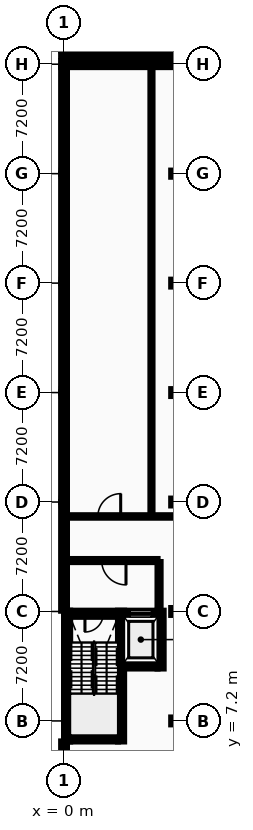
"""IFC4 building model, lengths in metres.
Left out: names, types, materials, properties, quantities, classifications, styles, units other than length and angle.
Written with IfcOpenShell. Run it as: python <this file> out.ifc"""

import sys

from ifc_helpers import new_model, si_unit, direction, frame, frame_2d, origin, origin_2d, place, context, subcontext, project, spatial, rectangle, i_section, extrude, element, fill, save


model = new_model("IFC4")
c1 = context("Model", 3, precision=1e-05, world=origin(), true_north=direction((0.0, 1.0)))
c2 = subcontext(c1, "Body", "Model", "MODEL_VIEW")
j1 = project(units=[si_unit("LENGTHUNIT", "METRE"), si_unit("PLANEANGLEUNIT", "RADIAN")], contexts=[c1])
p1 = place(None, origin())
s1 = spatial("IfcSite", under=j1, at=p1, CompositionType="ELEMENT")
p2 = place(p1, origin())
s2 = spatial("IfcBuilding", under=s1, at=p2, CompositionType="ELEMENT")
p3 = place(p2, frame((0.0, 0.0, 9.6)))
s3 = spatial("IfcBuildingStorey", under=s2, at=p3, CompositionType="ELEMENT", Elevation=9.6)
for number, where, z_axis, x_axis in (
    (1, (0.0, 21.6, 0.0), (0.0, 0.0, 1.0), (1.0, 0.0, 0.0)),
    (2, (0.0, 28.8, 0.0), (0.0, 0.0, 1.0), (1.0, 0.0, 0.0)),
    (3, (0.0, 36.0, 0.0), (0.0, 0.0, 1.0), (1.0, 0.0, 0.0)),
):
    element("IfcColumn", number, at=place(p3, frame(where, z_axis=z_axis, x_axis=x_axis)), inside=s3, PredefinedType="COLUMN", context=c2, shape_type="SweptSolid", body=[
        extrude(i_section(OverallWidth=0.3, OverallDepth=0.45, WebThickness=0.014, FlangeThickness=0.026, FilletRadius=0.027, at=origin_2d()), origin(), (0.0, 0.0, 1.0), 4.4),
    ])
p4 = place(p3, frame((0.0, 43.2, 0.0), z_axis=(0.0, 0.0, 1.0), x_axis=(1.0, 0.0, 0.0)))
e4 = element("IfcColumn", 4, at=p4, inside=s3, PredefinedType="COLUMN", context=c2, shape_type="SweptSolid", body=[
    extrude(i_section(OverallWidth=0.3, OverallDepth=0.4, WebThickness=0.013, FlangeThickness=0.024, FilletRadius=0.027, at=origin_2d()), origin(), (0.0, 0.0, 1.0), 4.4),
])
p5 = place(p3, frame((0.0, 50.4, 0.0), z_axis=(0.0, 0.0, 1.0), x_axis=(1.0, 0.0, 0.0)))
e5 = element("IfcColumn", 5, at=p5, inside=s3, PredefinedType="COLUMN", context=c2, shape_type="SweptSolid", body=[
    extrude(i_section(OverallWidth=0.3, OverallDepth=0.36, WebThickness=0.012, FlangeThickness=0.022, FilletRadius=0.027, at=origin_2d()), origin(), (0.0, 0.0, 1.0), 4.4),
])
p6 = place(p3, frame((0.0, 51.12, 0.0), z_axis=(0.0, 0.0, 1.0), x_axis=(1.0, 0.0, 0.0)))
e6 = element("IfcColumn", 6, at=p6, inside=s3, PredefinedType="COLUMN", context=c2, shape_type="SweptSolid", body=[
    extrude(i_section(OverallWidth=0.24, OverallDepth=0.24, WebThickness=0.01, FlangeThickness=0.017, FilletRadius=0.021, at=origin_2d()), origin(), (0.0, 0.0, 1.0), 4.4),
])
for number, where, z_axis, x_axis in (
    (7, (7.2, 7.2, 0.0), (0.0, 0.0, 1.0), (1.0, 0.0, 0.0)),
    (8, (7.2, 14.4, 0.0), (0.0, 0.0, 1.0), (1.0, 0.0, 0.0)),
    (9, (7.2, 21.6, 0.0), (0.0, 0.0, 1.0), (1.0, 0.0, 0.0)),
    (10, (7.2, 28.8, 0.0), (0.0, 0.0, 1.0), (1.0, 0.0, 0.0)),
    (11, (7.2, 36.0, 0.0), (0.0, 0.0, 1.0), (1.0, 0.0, 0.0)),
):
    element("IfcColumn", number, at=place(p3, frame(where, z_axis=z_axis, x_axis=x_axis)), inside=s3, PredefinedType="COLUMN", context=c2, shape_type="SweptSolid", body=[
        extrude(i_section(OverallWidth=0.3, OverallDepth=0.45, WebThickness=0.014, FlangeThickness=0.026, FilletRadius=0.027, at=origin_2d()), origin(), (0.0, 0.0, 1.0), 4.4),
    ])
p7 = place(p3, frame((7.2, 43.2, 0.0), z_axis=(0.0, 0.0, 1.0), x_axis=(1.0, 0.0, 0.0)))
e12 = element("IfcColumn", 12, at=p7, inside=s3, PredefinedType="COLUMN", context=c2, shape_type="SweptSolid", body=[
    extrude(i_section(OverallWidth=0.3, OverallDepth=0.4, WebThickness=0.013, FlangeThickness=0.024, FilletRadius=0.027, at=origin_2d()), origin(), (0.0, 0.0, 1.0), 4.4),
])
p8 = place(p3, frame((7.2, 50.4, 0.0), z_axis=(0.0, 0.0, 1.0), x_axis=(1.0, 0.0, 0.0)))
e13 = element("IfcColumn", 13, at=p8, inside=s3, PredefinedType="COLUMN", context=c2, shape_type="SweptSolid", body=[
    extrude(i_section(OverallWidth=0.3, OverallDepth=0.36, WebThickness=0.012, FlangeThickness=0.022, FilletRadius=0.027, at=origin_2d()), origin(), (0.0, 0.0, 1.0), 4.4),
])
p9 = place(p3, frame((7.2, 51.12, 0.0), z_axis=(0.0, 0.0, 1.0), x_axis=(1.0, 0.0, 0.0)))
e14 = element("IfcColumn", 14, at=p9, inside=s3, PredefinedType="COLUMN", context=c2, shape_type="SweptSolid", body=[
    extrude(i_section(OverallWidth=0.24, OverallDepth=0.24, WebThickness=0.01, FlangeThickness=0.017, FilletRadius=0.021, at=origin_2d()), origin(), (0.0, 0.0, 1.0), 4.4),
])
p10 = place(p3, frame((7.31, 50.4, 0.0), z_axis=(0.0, 0.0, 1.0), x_axis=(-1.0, 0.0, 0.0)))
e15 = element("IfcWall", 15, at=p10, inside=s3, PredefinedType="STANDARD", context=c2, shape_type="SweptSolid", body=[
    extrude(rectangle(XDim=7.5, YDim=0.38, at=frame_2d((3.75, 0.0))), origin(), (0.0, 0.0, 1.0), 3.895),
])
p11 = place(p10, frame((4.65, 0.0, 0.95)))
e16 = element("IfcOpeningElement", 16, at=p11, cuts=e15, PredefinedType="OPENING", context=c2, shape_type="SweptSolid", body=[
    extrude(rectangle(XDim=1.2, YDim=1.296, at=frame_2d((0.6, 0.648))), frame((0.0, 0.2, 0.0), z_axis=(0.0, -1.0, 0.0), x_axis=(1.0, 0.0, 0.0)), (0.0, 0.0, 1.0), 0.4),
])
p12 = place(p3, frame((0.0, 5.85, 0.0), z_axis=(0.0, 0.0, 1.0), x_axis=(0.0, -1.0, 0.0)))
e17 = element("IfcWall", 17, at=p12, inside=s3, PredefinedType="STANDARD", context=c2, shape_type="SweptSolid", body=[
    extrude(rectangle(XDim=5.66, YDim=0.38, at=frame_2d((2.83, 0.0))), origin(), (0.0, 0.0, 1.0), 4.2),
])
p13 = place(p12, frame((2.196, 0.0, 0.95)))
e18 = element("IfcOpeningElement", 18, at=p13, cuts=e17, PredefinedType="OPENING", context=c2, shape_type="SweptSolid", body=[
    extrude(rectangle(XDim=1.268, YDim=1.296, at=frame_2d((0.634, 0.648))), frame((0.0, 0.2, 0.0), z_axis=(0.0, -1.0, 0.0), x_axis=(1.0, 0.0, 0.0)), (0.0, 0.0, 1.0), 0.4),
])
p14 = place(p3, frame((0.0, 21.6, 0.0), z_axis=(0.0, 0.0, 1.0), x_axis=(0.0, -1.0, 0.0)))
e19 = element("IfcWall", 19, at=p14, inside=s3, PredefinedType="STANDARD", context=c2, shape_type="SweptSolid", body=[
    extrude(rectangle(XDim=7.15, YDim=0.38, at=frame_2d((3.575, 0.0))), origin(), (0.0, 0.0, 1.0), 4.2),
])
p15 = place(p14, frame((1.715, 0.0, 0.95)))
e20 = element("IfcOpeningElement", 20, at=p15, cuts=e19, PredefinedType="OPENING", context=c2, shape_type="SweptSolid", body=[
    extrude(rectangle(XDim=0.86, YDim=1.332, at=frame_2d((0.43, 0.666))), frame((0.0, 0.2, 0.0), z_axis=(0.0, -1.0, 0.0), x_axis=(1.0, 0.0, 0.0)), (0.0, 0.0, 1.0), 0.4),
])
p16 = place(p14, frame((4.575, 0.0, 0.95)))
e21 = element("IfcOpeningElement", 21, at=p16, cuts=e19, PredefinedType="OPENING", context=c2, shape_type="SweptSolid", body=[
    extrude(rectangle(XDim=0.86, YDim=1.332, at=frame_2d((0.43, 0.666))), frame((0.0, 0.2, 0.0), z_axis=(0.0, -1.0, 0.0), x_axis=(1.0, 0.0, 0.0)), (0.0, 0.0, 1.0), 0.4),
])
p17 = place(p3, frame((0.0, 28.8, 0.0), z_axis=(0.0, 0.0, 1.0), x_axis=(0.0, -1.0, 0.0)))
e22 = element("IfcWall", 22, at=p17, inside=s3, PredefinedType="STANDARD", context=c2, shape_type="SweptSolid", body=[
    extrude(rectangle(XDim=7.2, YDim=0.38, at=frame_2d((3.6, 0.0))), origin(), (0.0, 0.0, 1.0), 3.885),
])
p18 = place(p17, frame((1.713, 0.0, 0.95)))
e23 = element("IfcOpeningElement", 23, at=p18, cuts=e22, PredefinedType="OPENING", context=c2, shape_type="SweptSolid", body=[
    extrude(rectangle(XDim=0.894, YDim=1.332, at=frame_2d((0.447, 0.666))), frame((0.0, 0.2, 0.0), z_axis=(0.0, -1.0, 0.0), x_axis=(1.0, 0.0, 0.0)), (0.0, 0.0, 1.0), 0.4),
])
p19 = place(p17, frame((4.593, 0.0, 0.95)))
e24 = element("IfcOpeningElement", 24, at=p19, cuts=e22, PredefinedType="OPENING", context=c2, shape_type="SweptSolid", body=[
    extrude(rectangle(XDim=0.894, YDim=1.332, at=frame_2d((0.447, 0.666))), frame((0.0, 0.2, 0.0), z_axis=(0.0, -1.0, 0.0), x_axis=(1.0, 0.0, 0.0)), (0.0, 0.0, 1.0), 0.4),
])
p20 = place(p3, frame((0.0, 36.0, 0.0), z_axis=(0.0, 0.0, 1.0), x_axis=(0.0, -1.0, 0.0)))
e25 = element("IfcWall", 25, at=p20, inside=s3, PredefinedType="STANDARD", context=c2, shape_type="SweptSolid", body=[
    extrude(rectangle(XDim=7.2, YDim=0.38, at=frame_2d((3.6, 0.0))), origin(), (0.0, 0.0, 1.0), 3.885),
])
p21 = place(p20, frame((1.696, 0.0, 0.95)))
e26 = element("IfcOpeningElement", 26, at=p21, cuts=e25, PredefinedType="OPENING", context=c2, shape_type="SweptSolid", body=[
    extrude(rectangle(XDim=0.928, YDim=1.332, at=frame_2d((0.464, 0.666))), frame((0.0, 0.2, 0.0), z_axis=(0.0, -1.0, 0.0), x_axis=(1.0, 0.0, 0.0)), (0.0, 0.0, 1.0), 0.4),
])
p22 = place(p20, frame((4.576, 0.0, 0.95)))
e27 = element("IfcOpeningElement", 27, at=p22, cuts=e25, PredefinedType="OPENING", context=c2, shape_type="SweptSolid", body=[
    extrude(rectangle(XDim=0.928, YDim=1.332, at=frame_2d((0.464, 0.666))), frame((0.0, 0.2, 0.0), z_axis=(0.0, -1.0, 0.0), x_axis=(1.0, 0.0, 0.0)), (0.0, 0.0, 1.0), 0.4),
])
p23 = place(p3, frame((0.0, 43.2, 0.0), z_axis=(0.0, 0.0, 1.0), x_axis=(0.0, -1.0, 0.0)))
e28 = element("IfcWall", 28, at=p23, inside=s3, PredefinedType="STANDARD", context=c2, shape_type="SweptSolid", body=[
    extrude(rectangle(XDim=7.2, YDim=0.38, at=frame_2d((3.6, 0.0))), origin(), (0.0, 0.0, 1.0), 3.885),
])
p24 = place(p23, frame((1.679, 0.0, 0.95)))
e29 = element("IfcOpeningElement", 29, at=p24, cuts=e28, PredefinedType="OPENING", context=c2, shape_type="SweptSolid", body=[
    extrude(rectangle(XDim=0.962, YDim=1.332, at=frame_2d((0.481, 0.666))), frame((0.0, 0.2, 0.0), z_axis=(0.0, -1.0, 0.0), x_axis=(1.0, 0.0, 0.0)), (0.0, 0.0, 1.0), 0.4),
])
p25 = place(p23, frame((4.559, 0.0, 0.95)))
e30 = element("IfcOpeningElement", 30, at=p25, cuts=e28, PredefinedType="OPENING", context=c2, shape_type="SweptSolid", body=[
    extrude(rectangle(XDim=0.962, YDim=1.332, at=frame_2d((0.481, 0.666))), frame((0.0, 0.2, 0.0), z_axis=(0.0, -1.0, 0.0), x_axis=(1.0, 0.0, 0.0)), (0.0, 0.0, 1.0), 0.4),
])
p26 = place(p3, frame((0.0, 50.21, 0.0), z_axis=(0.0, 0.0, 1.0), x_axis=(0.0, -1.0, 0.0)))
e31 = element("IfcWall", 31, at=p26, inside=s3, PredefinedType="STANDARD", context=c2, shape_type="SweptSolid", body=[
    extrude(rectangle(XDim=7.01, YDim=0.38, at=frame_2d((3.505, 0.0))), origin(), (0.0, 0.0, 1.0), 3.885),
])
p27 = place(p26, frame((1.605, 0.0, 0.95)))
e32 = element("IfcOpeningElement", 32, at=p27, cuts=e31, PredefinedType="OPENING", context=c2, shape_type="SweptSolid", body=[
    extrude(rectangle(XDim=0.996, YDim=1.332, at=frame_2d((0.498, 0.666))), frame((0.0, 0.2, 0.0), z_axis=(0.0, -1.0, 0.0), x_axis=(1.0, 0.0, 0.0)), (0.0, 0.0, 1.0), 0.4),
])
p28 = place(p26, frame((4.409, 0.0, 0.95)))
e33 = element("IfcOpeningElement", 33, at=p28, cuts=e31, PredefinedType="OPENING", context=c2, shape_type="SweptSolid", body=[
    extrude(rectangle(XDim=0.996, YDim=1.332, at=frame_2d((0.498, 0.666))), frame((0.0, 0.2, 0.0), z_axis=(0.0, -1.0, 0.0), x_axis=(1.0, 0.0, 0.0)), (0.0, 0.0, 1.0), 0.4),
])
p29 = place(p3, frame((-0.19, 51.12, 0.0), z_axis=(0.0, 0.0, 1.0), x_axis=(1.0, 0.0, 0.0)))
e34 = element("IfcWall", 34, at=p29, inside=s3, PredefinedType="STANDARD", context=c2, shape_type="SweptSolid", body=[
    extrude(rectangle(XDim=7.39, YDim=0.38, at=frame_2d((3.695, 0.0))), origin(), (0.0, 0.0, 1.0), 3.875),
])
p30 = place(p29, frame((1.668, 0.0, 0.95)))
e35 = element("IfcOpeningElement", 35, at=p30, cuts=e34, PredefinedType="OPENING", context=c2, shape_type="SweptSolid", body=[
    extrude(rectangle(XDim=1.098, YDim=1.26, at=frame_2d((0.549, 0.63))), frame((0.0, 0.2, 0.0), z_axis=(0.0, -1.0, 0.0), x_axis=(1.0, 0.0, 0.0)), (0.0, 0.0, 1.0), 0.4),
])
p31 = place(p29, frame((4.624, 0.0, 0.95)))
e36 = element("IfcOpeningElement", 36, at=p31, cuts=e34, PredefinedType="OPENING", context=c2, shape_type="SweptSolid", body=[
    extrude(rectangle(XDim=1.098, YDim=1.26, at=frame_2d((0.549, 0.63))), frame((0.0, 0.2, 0.0), z_axis=(0.0, -1.0, 0.0), x_axis=(1.0, 0.0, 0.0)), (0.0, 0.0, 1.0), 0.4),
])
p32 = place(p3, frame((0.4, 6.05, 0.0), z_axis=(0.0, 0.0, 1.0), x_axis=(1.0, 0.0, 0.0)))
e37 = element("IfcWall", 37, at=p32, inside=s3, PredefinedType="SHEAR", context=c2, shape_type="SweptSolid", body=[
    extrude(rectangle(XDim=3.15, YDim=0.4, at=frame_2d((1.575, 0.0))), origin(), (0.0, 0.0, 1.0), 4.2),
])
p33 = place(p3, frame((0.4, 14.25, 0.0), z_axis=(0.0, 0.0, 1.0), x_axis=(1.0, 0.0, 0.0)))
e38 = element("IfcWall", 38, at=p33, inside=s3, PredefinedType="SHEAR", context=c2, shape_type="SweptSolid", body=[
    extrude(rectangle(XDim=3.15, YDim=0.4, at=frame_2d((1.575, 0.0))), origin(), (0.0, 0.0, 1.0), 4.2),
])
p34 = place(p33, frame((0.975, 0.0, 0.0)))
e39 = element("IfcOpeningElement", 39, at=p34, cuts=e38, PredefinedType="OPENING", context=c2, shape_type="SweptSolid", body=[
    extrude(rectangle(XDim=1.2, YDim=2.15, at=frame_2d((0.6, 1.075))), frame((0.0, 0.21, 0.0), z_axis=(0.0, -1.0, 0.0), x_axis=(1.0, 0.0, 0.0)), (0.0, 0.0, 1.0), 0.42),
])
for number, where, z_axis, x_axis in (
    (40, (0.2, 5.85, 0.0), (0.0, 0.0, 1.0), (0.0, 1.0, 0.0)),
    (41, (3.75, 5.85, 0.0), (0.0, 0.0, 1.0), (0.0, 1.0, 0.0)),
):
    element("IfcWall", number, at=place(p3, frame(where, z_axis=z_axis, x_axis=x_axis)), inside=s3, PredefinedType="SHEAR", context=c2, shape_type="SweptSolid", body=[
        extrude(rectangle(XDim=8.6, YDim=0.4, at=frame_2d((4.3, 0.0))), origin(), (0.0, 0.0, 1.0), 4.2),
    ])
p35 = place(p3, frame((3.95, 10.85, 0.0), z_axis=(0.0, 0.0, 1.0), x_axis=(1.0, 0.0, 0.0)))
e42 = element("IfcWall", 42, at=p35, inside=s3, PredefinedType="SHEAR", context=c2, shape_type="SweptSolid", body=[
    extrude(rectangle(XDim=2.2, YDim=0.4, at=frame_2d((1.1, 0.0))), origin(), (0.0, 0.0, 1.0), 4.2),
])
p36 = place(p3, frame((3.95, 14.25, 0.0), z_axis=(0.0, 0.0, 1.0), x_axis=(1.0, 0.0, 0.0)))
e43 = element("IfcWall", 43, at=p36, inside=s3, PredefinedType="SHEAR", context=c2, shape_type="SweptSolid", body=[
    extrude(rectangle(XDim=2.2, YDim=0.4, at=frame_2d((1.1, 0.0))), origin(), (0.0, 0.0, 1.0), 4.2),
])
p37 = place(p36, frame((0.4, 0.0, 0.0)))
e44 = element("IfcOpeningElement", 44, at=p37, cuts=e43, PredefinedType="OPENING", context=c2, shape_type="SweptSolid", body=[
    extrude(rectangle(XDim=1.4, YDim=2.2, at=frame_2d((0.7, 1.1))), frame((0.0, 0.21, 0.0), z_axis=(0.0, -1.0, 0.0), x_axis=(1.0, 0.0, 0.0)), (0.0, 0.0, 1.0), 0.42),
])
p38 = place(p3, frame((6.35, 10.65, 0.0), z_axis=(0.0, 0.0, 1.0), x_axis=(0.0, 1.0, 0.0)))
e45 = element("IfcWall", 45, at=p38, inside=s3, PredefinedType="SHEAR", context=c2, shape_type="SweptSolid", body=[
    extrude(rectangle(XDim=3.8, YDim=0.4, at=frame_2d((1.9, 0.0))), origin(), (0.0, 0.0, 1.0), 4.2),
])
p39 = place(p3, frame((0.4, 17.75, 0.0), z_axis=(0.0, 0.0, 1.0), x_axis=(1.0, 0.0, 0.0)))
e46 = element("IfcWall", 46, at=p39, inside=s3, PredefinedType="PARTITIONING", context=c2, shape_type="SweptSolid", body=[
    extrude(rectangle(XDim=5.75, YDim=0.2, at=frame_2d((2.875, 0.0))), origin(), (0.0, 0.0, 1.0), 4.2),
])
p40 = place(p39, frame((2.075, 0.0, 0.0)))
e47 = element("IfcOpeningElement", 47, at=p40, cuts=e46, PredefinedType="OPENING", context=c2, shape_type="SweptSolid", body=[
    extrude(rectangle(XDim=1.6, YDim=2.2, at=frame_2d((0.8, 1.1))), frame((0.0, 0.11, 0.0), z_axis=(0.0, -1.0, 0.0), x_axis=(1.0, 0.0, 0.0)), (0.0, 0.0, 1.0), 0.22),
])
p41 = place(p3, frame((6.25, 14.45, 0.0), z_axis=(0.0, 0.0, 1.0), x_axis=(0.0, 1.0, 0.0)))
e48 = element("IfcWall", 48, at=p41, inside=s3, PredefinedType="PARTITIONING", context=c2, shape_type="SweptSolid", body=[
    extrude(rectangle(XDim=3.2, YDim=0.2, at=frame_2d((1.6, 0.0))), origin(), (0.0, 0.0, 1.0), 4.2),
])
p42 = place(p3, frame((0.2, 20.65, 0.0), z_axis=(0.0, 0.0, 1.0), x_axis=(1.0, 0.0, 0.0)))
e49 = element("IfcWall", 49, at=p42, inside=s3, PredefinedType="PARTITIONING", context=c2, shape_type="SweptSolid", body=[
    extrude(rectangle(XDim=13.9, YDim=0.16, at=frame_2d((6.95, 0.0))), origin(), (0.0, 0.0, 1.0), 4.2),
])
p43 = place(p42, frame((2.025, 0.0, 0.0)))
e50 = element("IfcOpeningElement", 50, at=p43, cuts=e49, PredefinedType="OPENING", context=c2, shape_type="SweptSolid", body=[
    extrude(rectangle(XDim=1.5, YDim=2.2, at=frame_2d((0.75, 1.1))), frame((0.0, 0.09, 0.0), z_axis=(0.0, -1.0, 0.0), x_axis=(1.0, 0.0, 0.0)), (0.0, 0.0, 1.0), 0.18),
])
p44 = place(p42, frame((9.272, 0.0, 0.0)))
e51 = element("IfcOpeningElement", 51, at=p44, cuts=e49, PredefinedType="OPENING", context=c2, shape_type="SweptSolid", body=[
    extrude(rectangle(XDim=0.906, YDim=2.152, at=frame_2d((0.453, 1.076))), frame((0.0, 0.09, 0.0), z_axis=(0.0, -1.0, 0.0), x_axis=(1.0, 0.0, 0.0)), (0.0, 0.0, 1.0), 0.18),
])
p45 = place(p3, frame((5.75, 20.73, 0.0), z_axis=(0.0, 0.0, 1.0), x_axis=(0.0, 1.0, 0.0)))
e52 = element("IfcWall", 52, at=p45, inside=s3, PredefinedType="PARTITIONING", context=c2, shape_type="SweptSolid", body=[
    extrude(rectangle(XDim=29.47, YDim=0.135, at=frame_2d((14.735, 0.0))), origin(), (0.0, 0.0, 1.0), 4.2),
])
p46 = place(p11, origin())
e53 = element("IfcWindow", 53, at=p46, inside=s3, PartitioningType="SINGLE_PANEL", PredefinedType="WINDOW", context=c2, shape_type="SweptSolid", body=[
    extrude(rectangle(XDim=1.2, YDim=1.296, at=frame_2d((0.6, 0.648))), frame((0.0, 0.03, 0.0), z_axis=(0.0, -1.0, 0.0), x_axis=(1.0, 0.0, 0.0)), (0.0, 0.0, 1.0), 0.06),
])
fill(e16, e53)
p47 = place(p15, origin())
e54 = element("IfcWindow", 54, at=p47, inside=s3, PartitioningType="SINGLE_PANEL", PredefinedType="WINDOW", context=c2, shape_type="SweptSolid", body=[
    extrude(rectangle(XDim=0.86, YDim=1.332, at=frame_2d((0.43, 0.666))), frame((0.0, 0.03, 0.0), z_axis=(0.0, -1.0, 0.0), x_axis=(1.0, 0.0, 0.0)), (0.0, 0.0, 1.0), 0.06),
])
fill(e20, e54)
p48 = place(p16, origin())
e55 = element("IfcWindow", 55, at=p48, inside=s3, PartitioningType="SINGLE_PANEL", PredefinedType="WINDOW", context=c2, shape_type="SweptSolid", body=[
    extrude(rectangle(XDim=0.86, YDim=1.332, at=frame_2d((0.43, 0.666))), frame((0.0, 0.03, 0.0), z_axis=(0.0, -1.0, 0.0), x_axis=(1.0, 0.0, 0.0)), (0.0, 0.0, 1.0), 0.06),
])
fill(e21, e55)
p49 = place(p18, origin())
e56 = element("IfcWindow", 56, at=p49, inside=s3, PartitioningType="SINGLE_PANEL", PredefinedType="WINDOW", context=c2, shape_type="SweptSolid", body=[
    extrude(rectangle(XDim=0.894, YDim=1.332, at=frame_2d((0.447, 0.666))), frame((0.0, 0.03, 0.0), z_axis=(0.0, -1.0, 0.0), x_axis=(1.0, 0.0, 0.0)), (0.0, 0.0, 1.0), 0.06),
])
fill(e23, e56)
p50 = place(p19, origin())
e57 = element("IfcWindow", 57, at=p50, inside=s3, PartitioningType="SINGLE_PANEL", PredefinedType="WINDOW", context=c2, shape_type="SweptSolid", body=[
    extrude(rectangle(XDim=0.894, YDim=1.332, at=frame_2d((0.447, 0.666))), frame((0.0, 0.03, 0.0), z_axis=(0.0, -1.0, 0.0), x_axis=(1.0, 0.0, 0.0)), (0.0, 0.0, 1.0), 0.06),
])
fill(e24, e57)
p51 = place(p21, origin())
e58 = element("IfcWindow", 58, at=p51, inside=s3, PartitioningType="SINGLE_PANEL", PredefinedType="WINDOW", context=c2, shape_type="SweptSolid", body=[
    extrude(rectangle(XDim=0.928, YDim=1.332, at=frame_2d((0.464, 0.666))), frame((0.0, 0.03, 0.0), z_axis=(0.0, -1.0, 0.0), x_axis=(1.0, 0.0, 0.0)), (0.0, 0.0, 1.0), 0.06),
])
fill(e26, e58)
p52 = place(p22, origin())
e59 = element("IfcWindow", 59, at=p52, inside=s3, PartitioningType="SINGLE_PANEL", PredefinedType="WINDOW", context=c2, shape_type="SweptSolid", body=[
    extrude(rectangle(XDim=0.928, YDim=1.332, at=frame_2d((0.464, 0.666))), frame((0.0, 0.03, 0.0), z_axis=(0.0, -1.0, 0.0), x_axis=(1.0, 0.0, 0.0)), (0.0, 0.0, 1.0), 0.06),
])
fill(e27, e59)
p53 = place(p24, origin())
e60 = element("IfcWindow", 60, at=p53, inside=s3, PartitioningType="SINGLE_PANEL", PredefinedType="WINDOW", context=c2, shape_type="SweptSolid", body=[
    extrude(rectangle(XDim=0.962, YDim=1.332, at=frame_2d((0.481, 0.666))), frame((0.0, 0.03, 0.0), z_axis=(0.0, -1.0, 0.0), x_axis=(1.0, 0.0, 0.0)), (0.0, 0.0, 1.0), 0.06),
])
fill(e29, e60)
p54 = place(p25, origin())
e61 = element("IfcWindow", 61, at=p54, inside=s3, PartitioningType="SINGLE_PANEL", PredefinedType="WINDOW", context=c2, shape_type="SweptSolid", body=[
    extrude(rectangle(XDim=0.962, YDim=1.332, at=frame_2d((0.481, 0.666))), frame((0.0, 0.03, 0.0), z_axis=(0.0, -1.0, 0.0), x_axis=(1.0, 0.0, 0.0)), (0.0, 0.0, 1.0), 0.06),
])
fill(e30, e61)
p55 = place(p27, origin())
e62 = element("IfcWindow", 62, at=p55, inside=s3, PartitioningType="SINGLE_PANEL", PredefinedType="WINDOW", context=c2, shape_type="SweptSolid", body=[
    extrude(rectangle(XDim=0.996, YDim=1.332, at=frame_2d((0.498, 0.666))), frame((0.0, 0.03, 0.0), z_axis=(0.0, -1.0, 0.0), x_axis=(1.0, 0.0, 0.0)), (0.0, 0.0, 1.0), 0.06),
])
fill(e32, e62)
p56 = place(p28, origin())
e63 = element("IfcWindow", 63, at=p56, inside=s3, PartitioningType="SINGLE_PANEL", PredefinedType="WINDOW", context=c2, shape_type="SweptSolid", body=[
    extrude(rectangle(XDim=0.996, YDim=1.332, at=frame_2d((0.498, 0.666))), frame((0.0, 0.03, 0.0), z_axis=(0.0, -1.0, 0.0), x_axis=(1.0, 0.0, 0.0)), (0.0, 0.0, 1.0), 0.06),
])
fill(e33, e63)
p57 = place(p30, origin())
e64 = element("IfcWindow", 64, at=p57, inside=s3, PartitioningType="SINGLE_PANEL", PredefinedType="WINDOW", context=c2, shape_type="SweptSolid", body=[
    extrude(rectangle(XDim=1.098, YDim=1.26, at=frame_2d((0.549, 0.63))), frame((0.0, 0.03, 0.0), z_axis=(0.0, -1.0, 0.0), x_axis=(1.0, 0.0, 0.0)), (0.0, 0.0, 1.0), 0.06),
])
fill(e35, e64)
p58 = place(p31, origin())
e65 = element("IfcWindow", 65, at=p58, inside=s3, PartitioningType="SINGLE_PANEL", PredefinedType="WINDOW", context=c2, shape_type="SweptSolid", body=[
    extrude(rectangle(XDim=1.098, YDim=1.26, at=frame_2d((0.549, 0.63))), frame((0.0, 0.03, 0.0), z_axis=(0.0, -1.0, 0.0), x_axis=(1.0, 0.0, 0.0)), (0.0, 0.0, 1.0), 0.06),
])
fill(e36, e65)
p59 = place(p34, frame((1.2, 0.0, 0.0), z_axis=(0.0, 0.0, 1.0), x_axis=(-1.0, 0.0, 0.0)))
e66 = element("IfcDoor", 66, at=p59, inside=s3, OperationType="SINGLE_SWING_LEFT", PredefinedType="DOOR", context=c2, shape_type="SweptSolid", body=[
    extrude(rectangle(XDim=1.2, YDim=2.15, at=frame_2d((0.6, 1.075))), frame((0.0, 0.025, 0.0), z_axis=(0.0, -1.0, 0.0), x_axis=(1.0, 0.0, 0.0)), (0.0, 0.0, 1.0), 0.05),
])
fill(e39, e66)
p60 = place(p37, origin())
e67 = element("IfcDoor", 67, at=p60, inside=s3, OperationType="SLIDING_TO_LEFT", PredefinedType="DOOR", context=c2, shape_type="SweptSolid", body=[
    extrude(rectangle(XDim=1.4, YDim=2.2, at=frame_2d((0.7, 1.1))), frame((0.0, 0.025, 0.0), z_axis=(0.0, -1.0, 0.0), x_axis=(1.0, 0.0, 0.0)), (0.0, 0.0, 1.0), 0.05),
])
fill(e44, e67)
p61 = place(p40, origin())
e68 = element("IfcDoor", 68, at=p61, inside=s3, OperationType="DOUBLE_DOOR_SINGLE_SWING", PredefinedType="DOOR", context=c2, shape_type="SweptSolid", body=[
    extrude(rectangle(XDim=1.6, YDim=2.2, at=frame_2d((0.8, 1.1))), frame((0.0, 0.025, 0.0), z_axis=(0.0, -1.0, 0.0), x_axis=(1.0, 0.0, 0.0)), (0.0, 0.0, 1.0), 0.05),
])
fill(e47, e68)
p62 = place(p43, frame((1.5, 0.0, 0.0), z_axis=(0.0, 0.0, 1.0), x_axis=(-1.0, 0.0, 0.0)))
e69 = element("IfcDoor", 69, at=p62, inside=s3, OperationType="DOUBLE_DOOR_SINGLE_SWING", PredefinedType="DOOR", context=c2, shape_type="SweptSolid", body=[
    extrude(rectangle(XDim=1.5, YDim=2.2, at=frame_2d((0.75, 1.1))), frame((0.0, 0.025, 0.0), z_axis=(0.0, -1.0, 0.0), x_axis=(1.0, 0.0, 0.0)), (0.0, 0.0, 1.0), 0.05),
])
fill(e50, e69)
save(model, sys.argv[1])
